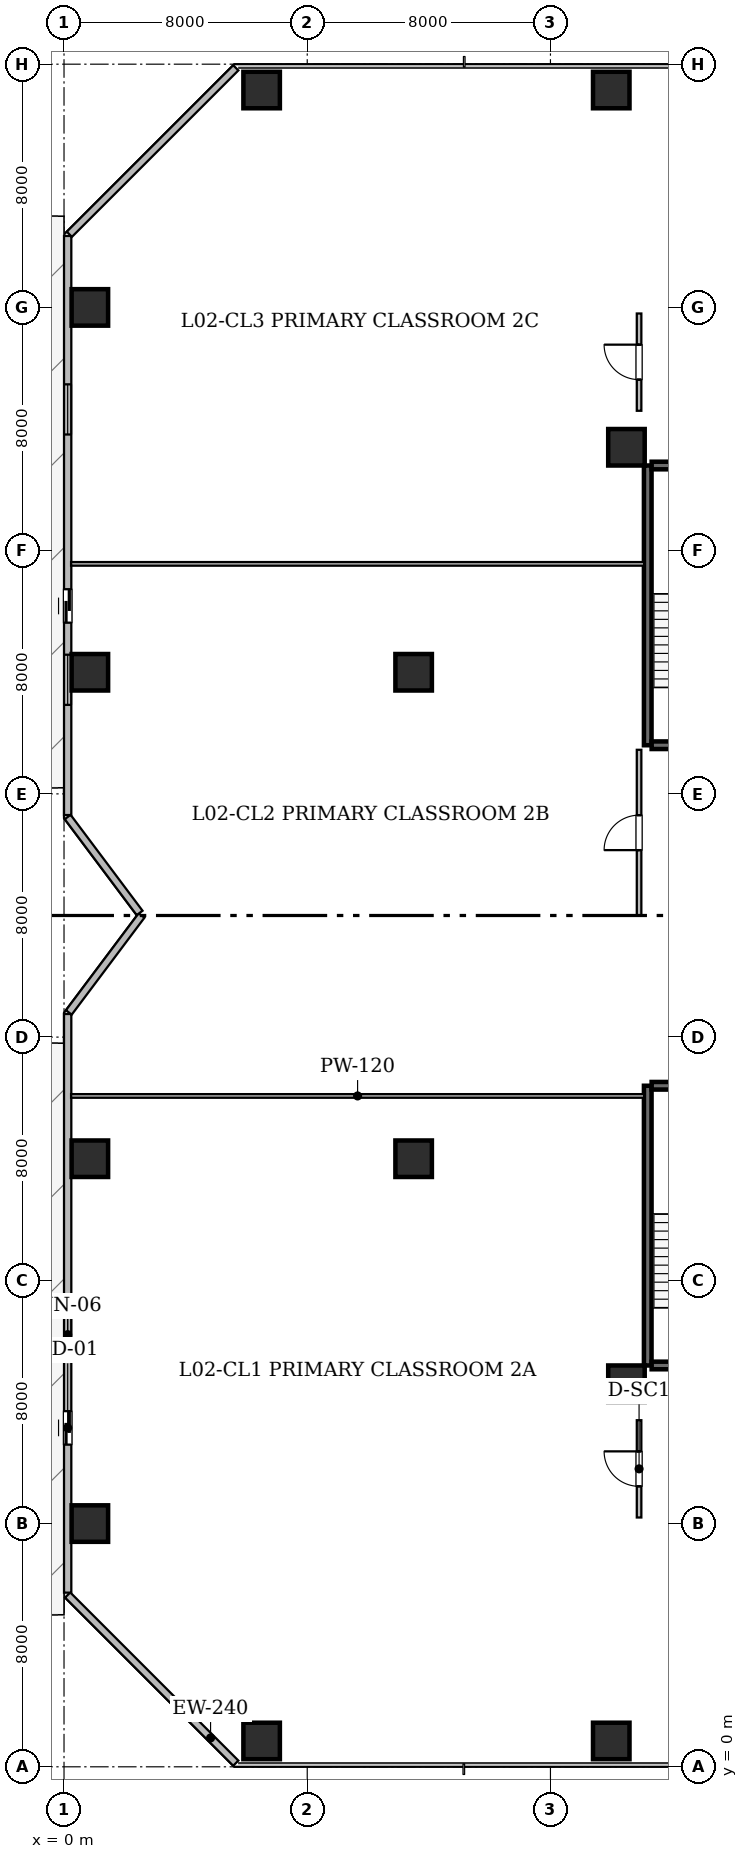
"""IFC4 building model, lengths in metres.
Left out: names, types, materials, properties, quantities, classifications, styles, units other than length and angle.
Written with IfcOpenShell. Run it as: python <this file> out.ifc"""

import sys

from ifc_helpers import new_model, si_unit, direction, frame, frame_2d, origin, origin_2d, place, context, subcontext, project, spatial, rectangle, hollow_rectangle, extrude, element, fill, save


model = new_model("IFC4")
c1 = context("Model", 3, precision=1e-05, world=origin(), true_north=direction((0.0, 1.0)))
c2 = subcontext(c1, "Body", "Model", "MODEL_VIEW")
j1 = project(units=[si_unit("LENGTHUNIT", "METRE"), si_unit("PLANEANGLEUNIT", "RADIAN")], contexts=[c1])
p1 = place(None, origin())
s1 = spatial("IfcSite", under=j1, at=p1, CompositionType="ELEMENT")
p2 = place(p1, origin())
s2 = spatial("IfcBuilding", under=s1, at=p2, CompositionType="ELEMENT")
p3 = place(p2, frame((0.0, 0.0, 12.0)))
s3 = spatial("IfcBuildingStorey", under=s2, at=p3, CompositionType="ELEMENT", Elevation=12.0)
for number, where, z_axis, x_axis in (
    (1, (6.5, 0.85, 0.0), (0.0, 0.0, 1.0), (1.0, 0.0, 0.0)),
    (2, (18.0, 0.85, 0.0), (0.0, 0.0, 1.0), (1.0, 0.0, 0.0)),
    (3, (6.5, 55.15, 0.0), (0.0, 0.0, 1.0), (1.0, 0.0, 0.0)),
    (4, (18.0, 55.15, 0.0), (0.0, 0.0, 1.0), (1.0, 0.0, 0.0)),
    (5, (0.85, 8.0, 0.0), (0.0, 0.0, 1.0), (1.0, 0.0, 0.0)),
    (6, (0.85, 20.0, 0.0), (0.0, 0.0, 1.0), (1.0, 0.0, 0.0)),
    (7, (0.85, 36.0, 0.0), (0.0, 0.0, 1.0), (1.0, 0.0, 0.0)),
    (8, (0.85, 48.0, 0.0), (0.0, 0.0, 1.0), (1.0, 0.0, 0.0)),
    (9, (18.5, 12.6, 0.0), (0.0, 0.0, 1.0), (1.0, 0.0, 0.0)),
    (10, (18.5, 43.4, 0.0), (0.0, 0.0, 1.0), (1.0, 0.0, 0.0)),
    (11, (11.5, 20.0, 0.0), (0.0, 0.0, 1.0), (1.0, 0.0, 0.0)),
    (12, (11.5, 36.0, 0.0), (0.0, 0.0, 1.0), (1.0, 0.0, 0.0)),
):
    element("IfcColumn", number, at=place(p3, frame(where, z_axis=z_axis, x_axis=x_axis)), inside=s3, PredefinedType="COLUMN", context=c2, shape_type="SweptSolid", body=[
        extrude(hollow_rectangle(XDim=1.2, YDim=1.2, WallThickness=0.06, at=origin_2d()), origin(), (0.0, 0.0, 1.0), 4.2),
    ])
p4 = place(p3, frame((5.65, 0.12, 0.0), z_axis=(0.0, 0.0, 1.0), x_axis=(-0.707106781187, 0.707106781187, 0.0)))
e13 = element("IfcWall", 13, at=p4, inside=s3, PredefinedType="STANDARD", context=c2, shape_type="SweptSolid", body=[
    extrude(rectangle(XDim=7.82, YDim=0.24, at=frame_2d((3.91, 0.0))), origin(), (0.0, 0.0, 1.0), 3.92),
])
p5 = place(p3, frame((0.12, 5.728, 0.0), z_axis=(0.0, 0.0, 1.0), x_axis=(0.0, 1.0, 0.0)))
e14 = element("IfcWall", 14, at=p5, inside=s3, PredefinedType="STANDARD", context=c2, shape_type="SweptSolid", body=[
    extrude(rectangle(XDim=19.032, YDim=0.24, at=frame_2d((9.516, 0.0))), origin(), (0.0, 0.0, 1.0), 3.92),
])
p6 = place(p5, frame((4.869, 0.0, 0.0)))
e15 = element("IfcOpeningElement", 15, at=p6, cuts=e14, PredefinedType="OPENING", context=c2, shape_type="SweptSolid", body=[
    extrude(rectangle(XDim=1.1, YDim=2.2, at=frame_2d((0.55, 1.1))), frame((0.0, 0.13, 0.0), z_axis=(0.0, -1.0, 0.0), x_axis=(1.0, 0.0, 0.0)), (0.0, 0.0, 1.0), 0.26),
])
p7 = place(p5, frame((7.661, 0.0, 0.85)))
e16 = element("IfcOpeningElement", 16, at=p7, cuts=e14, PredefinedType="OPENING", context=c2, shape_type="SweptSolid", body=[
    extrude(rectangle(XDim=1.65, YDim=1.55, at=frame_2d((0.825, 0.775))), frame((0.0, 0.13, 0.0), z_axis=(0.0, -1.0, 0.0), x_axis=(1.0, 0.0, 0.0)), (0.0, 0.0, 1.0), 0.26),
])
p8 = place(p3, frame((0.158, 24.811, 0.0), z_axis=(0.0, 0.0, 1.0), x_axis=(0.600058791648, 0.799955902889, 0.0)))
e17 = element("IfcWall", 17, at=p8, inside=s3, PredefinedType="STANDARD", context=c2, shape_type="SweptSolid", body=[
    extrude(rectangle(XDim=3.986, YDim=0.24, at=frame_2d((1.993, 0.0))), origin(), (0.0, 0.0, 1.0), 3.92),
])
p9 = place(p3, frame((2.487, 28.084, 0.0), z_axis=(0.0, 0.0, 1.0), x_axis=(-0.599990098106, 0.800007426325, 0.0)))
e18 = element("IfcWall", 18, at=p9, inside=s3, PredefinedType="STANDARD", context=c2, shape_type="SweptSolid", body=[
    extrude(rectangle(XDim=3.945, YDim=0.24, at=frame_2d((1.973, 0.0))), origin(), (0.0, 0.0, 1.0), 3.92),
])
p10 = place(p3, frame((0.12, 31.304, 0.0), z_axis=(0.0, 0.0, 1.0), x_axis=(0.0, 1.0, 0.0)))
e19 = element("IfcWall", 19, at=p10, inside=s3, PredefinedType="STANDARD", context=c2, shape_type="SweptSolid", body=[
    extrude(rectangle(XDim=19.046, YDim=0.24, at=frame_2d((9.523, 0.0))), origin(), (0.0, 0.0, 1.0), 3.92),
])
p11 = place(p10, frame((6.327, 0.0, 0.0)))
e20 = element("IfcOpeningElement", 20, at=p11, cuts=e19, PredefinedType="OPENING", context=c2, shape_type="SweptSolid", body=[
    extrude(rectangle(XDim=1.1, YDim=2.2, at=frame_2d((0.55, 1.1))), frame((0.0, 0.13, 0.0), z_axis=(0.0, -1.0, 0.0), x_axis=(1.0, 0.0, 0.0)), (0.0, 0.0, 1.0), 0.26),
])
p12 = place(p10, frame((3.623, 0.0, 0.85)))
e21 = element("IfcOpeningElement", 21, at=p12, cuts=e19, PredefinedType="OPENING", context=c2, shape_type="SweptSolid", body=[
    extrude(rectangle(XDim=1.65, YDim=1.55, at=frame_2d((0.825, 0.775))), frame((0.0, 0.13, 0.0), z_axis=(0.0, -1.0, 0.0), x_axis=(1.0, 0.0, 0.0)), (0.0, 0.0, 1.0), 0.26),
])
p13 = place(p10, frame((12.516, 0.0, 0.85)))
e22 = element("IfcOpeningElement", 22, at=p13, cuts=e19, PredefinedType="OPENING", context=c2, shape_type="SweptSolid", body=[
    extrude(rectangle(XDim=1.65, YDim=1.55, at=frame_2d((0.825, 0.775))), frame((0.0, 0.13, 0.0), z_axis=(0.0, -1.0, 0.0), x_axis=(1.0, 0.0, 0.0)), (0.0, 0.0, 1.0), 0.26),
])
p14 = place(p3, frame((0.175, 50.405, 0.0), z_axis=(0.0, 0.0, 1.0), x_axis=(0.707106781187, 0.707106781187, 0.0)))
e23 = element("IfcWall", 23, at=p14, inside=s3, PredefinedType="STANDARD", context=c2, shape_type="SweptSolid", body=[
    extrude(rectangle(XDim=7.743, YDim=0.24, at=frame_2d((3.871, 0.0))), origin(), (0.0, 0.0, 1.0), 3.92),
])
p15 = place(p3, frame((19.2, 13.2, 0.0), z_axis=(0.0, 0.0, 1.0), x_axis=(0.0, 1.0, 0.0)))
e24 = element("IfcWall", 24, at=p15, inside=s3, PredefinedType="SHEAR", context=c2, shape_type="SweptSolid", body=[
    extrude(rectangle(XDim=9.2, YDim=0.25, at=frame_2d((4.6, 0.0))), origin(), (0.0, 0.0, 1.0), 3.92),
])
for number, where, z_axis, x_axis in (
    (25, (19.329, 13.2, 0.0), (0.0, 0.0, 1.0), (1.0, 0.0, 0.0)),
    (26, (19.329, 22.4, 0.0), (0.0, 0.0, 1.0), (1.0, 0.0, 0.0)),
):
    element("IfcWall", number, at=place(p3, frame(where, z_axis=z_axis, x_axis=x_axis)), inside=s3, PredefinedType="SHEAR", context=c2, shape_type="SweptSolid", body=[
        extrude(rectangle(XDim=3.692, YDim=0.25, at=frame_2d((1.846, 0.0))), origin(), (0.0, 0.0, 1.0), 3.92),
    ])
p16 = place(p3, frame((19.2, 33.6, 0.0), z_axis=(0.0, 0.0, 1.0), x_axis=(0.0, 1.0, 0.0)))
e27 = element("IfcWall", 27, at=p16, inside=s3, PredefinedType="SHEAR", context=c2, shape_type="SweptSolid", body=[
    extrude(rectangle(XDim=9.2, YDim=0.25, at=frame_2d((4.6, 0.0))), origin(), (0.0, 0.0, 1.0), 3.92),
])
for number, where, z_axis, x_axis in (
    (28, (19.329, 33.6, 0.0), (0.0, 0.0, 1.0), (1.0, 0.0, 0.0)),
    (29, (19.329, 42.8, 0.0), (0.0, 0.0, 1.0), (1.0, 0.0, 0.0)),
):
    element("IfcWall", number, at=place(p3, frame(where, z_axis=z_axis, x_axis=x_axis)), inside=s3, PredefinedType="SHEAR", context=c2, shape_type="SweptSolid", body=[
        extrude(rectangle(XDim=3.692, YDim=0.25, at=frame_2d((1.846, 0.0))), origin(), (0.0, 0.0, 1.0), 3.92),
    ])
p17 = place(p3, frame((18.915, 8.2, 0.0), z_axis=(0.0, 0.0, 1.0), x_axis=(0.0, 1.0, 0.0)))
e30 = element("IfcWall", 30, at=p17, inside=s3, PredefinedType="STANDARD", context=c2, shape_type="SweptSolid", body=[
    extrude(rectangle(XDim=3.2, YDim=0.15, at=frame_2d((1.6, 0.0))), origin(), (0.0, 0.0, 1.0), 3.92),
])
p18 = place(p17, frame((1.025, 0.0, 0.0)))
e31 = element("IfcOpeningElement", 31, at=p18, cuts=e30, PredefinedType="OPENING", context=c2, shape_type="SweptSolid", body=[
    extrude(rectangle(XDim=1.15, YDim=2.2, at=frame_2d((0.575, 1.1))), frame((0.0, 0.085, 0.0), z_axis=(0.0, -1.0, 0.0), x_axis=(1.0, 0.0, 0.0)), (0.0, 0.0, 1.0), 0.17),
])
p19 = place(p3, frame((18.915, 28.0, 0.0), z_axis=(0.0, 0.0, 1.0), x_axis=(0.0, 1.0, 0.0)))
e32 = element("IfcWall", 32, at=p19, inside=s3, PredefinedType="STANDARD", context=c2, shape_type="SweptSolid", body=[
    extrude(rectangle(XDim=5.45, YDim=0.15, at=frame_2d((2.725, 0.0))), origin(), (0.0, 0.0, 1.0), 3.92),
])
p20 = place(p19, frame((2.15, 0.0, 0.0)))
e33 = element("IfcOpeningElement", 33, at=p20, cuts=e32, PredefinedType="OPENING", context=c2, shape_type="SweptSolid", body=[
    extrude(rectangle(XDim=1.15, YDim=2.2, at=frame_2d((0.575, 1.1))), frame((0.0, 0.085, 0.0), z_axis=(0.0, -1.0, 0.0), x_axis=(1.0, 0.0, 0.0)), (0.0, 0.0, 1.0), 0.17),
])
p21 = place(p3, frame((18.915, 44.6, 0.0), z_axis=(0.0, 0.0, 1.0), x_axis=(0.0, 1.0, 0.0)))
e34 = element("IfcWall", 34, at=p21, inside=s3, PredefinedType="STANDARD", context=c2, shape_type="SweptSolid", body=[
    extrude(rectangle(XDim=3.2, YDim=0.15, at=frame_2d((1.6, 0.0))), origin(), (0.0, 0.0, 1.0), 3.92),
])
p22 = place(p21, frame((1.025, 0.0, 0.0)))
e35 = element("IfcOpeningElement", 35, at=p22, cuts=e34, PredefinedType="OPENING", context=c2, shape_type="SweptSolid", body=[
    extrude(rectangle(XDim=1.15, YDim=2.2, at=frame_2d((0.575, 1.1))), frame((0.0, 0.085, 0.0), z_axis=(0.0, -1.0, 0.0), x_axis=(1.0, 0.0, 0.0)), (0.0, 0.0, 1.0), 0.17),
])
for number, where, z_axis, x_axis in (
    (36, (0.232, 22.065, 0.0), (0.0, 0.0, 1.0), (1.0, 0.0, 0.0)),
    (37, (0.232, 39.565, 0.0), (0.0, 0.0, 1.0), (1.0, 0.0, 0.0)),
):
    element("IfcWall", number, at=place(p3, frame(where, z_axis=z_axis, x_axis=x_axis)), inside=s3, PredefinedType="PARTITIONING", context=c2, shape_type="SweptSolid", body=[
        extrude(rectangle(XDim=18.849, YDim=0.12, at=frame_2d((9.425, 0.0))), origin(), (0.0, 0.0, 1.0), 3.055),
    ])
p23 = place(p6, origin())
e38 = element("IfcDoor", 38, at=p23, inside=s3, OperationType="SLIDING_TO_LEFT", PredefinedType="DOOR", context=c2, shape_type="SweptSolid", body=[
    extrude(rectangle(XDim=1.1, YDim=2.2, at=frame_2d((0.55, 1.1))), frame((0.0, 0.025, 0.0), z_axis=(0.0, -1.0, 0.0), x_axis=(1.0, 0.0, 0.0)), (0.0, 0.0, 1.0), 0.05),
])
fill(e15, e38)
p24 = place(p11, origin())
e39 = element("IfcDoor", 39, at=p24, inside=s3, OperationType="SLIDING_TO_LEFT", PredefinedType="DOOR", context=c2, shape_type="SweptSolid", body=[
    extrude(rectangle(XDim=1.1, YDim=2.2, at=frame_2d((0.55, 1.1))), frame((0.0, 0.025, 0.0), z_axis=(0.0, -1.0, 0.0), x_axis=(1.0, 0.0, 0.0)), (0.0, 0.0, 1.0), 0.05),
])
fill(e20, e39)
p25 = place(p7, origin())
e40 = element("IfcWindow", 40, at=p25, inside=s3, PartitioningType="SINGLE_PANEL", PredefinedType="WINDOW", context=c2, shape_type="SweptSolid", body=[
    extrude(rectangle(XDim=1.65, YDim=1.55, at=frame_2d((0.825, 0.775))), frame((0.0, 0.03, 0.0), z_axis=(0.0, -1.0, 0.0), x_axis=(1.0, 0.0, 0.0)), (0.0, 0.0, 1.0), 0.06),
])
fill(e16, e40)
p26 = place(p12, origin())
e41 = element("IfcWindow", 41, at=p26, inside=s3, PartitioningType="SINGLE_PANEL", PredefinedType="WINDOW", context=c2, shape_type="SweptSolid", body=[
    extrude(rectangle(XDim=1.65, YDim=1.55, at=frame_2d((0.825, 0.775))), frame((0.0, 0.03, 0.0), z_axis=(0.0, -1.0, 0.0), x_axis=(1.0, 0.0, 0.0)), (0.0, 0.0, 1.0), 0.06),
])
fill(e21, e41)
p27 = place(p13, origin())
e42 = element("IfcWindow", 42, at=p27, inside=s3, PartitioningType="SINGLE_PANEL", PredefinedType="WINDOW", context=c2, shape_type="SweptSolid", body=[
    extrude(rectangle(XDim=1.65, YDim=1.55, at=frame_2d((0.825, 0.775))), frame((0.0, 0.03, 0.0), z_axis=(0.0, -1.0, 0.0), x_axis=(1.0, 0.0, 0.0)), (0.0, 0.0, 1.0), 0.06),
])
fill(e22, e42)
p28 = place(p18, origin())
e43 = element("IfcDoor", 43, at=p28, inside=s3, OperationType="SINGLE_SWING_RIGHT", PredefinedType="DOOR", context=c2, shape_type="SweptSolid", body=[
    extrude(rectangle(XDim=1.15, YDim=2.2, at=frame_2d((0.575, 1.1))), frame((0.0, 0.025, 0.0), z_axis=(0.0, -1.0, 0.0), x_axis=(1.0, 0.0, 0.0)), (0.0, 0.0, 1.0), 0.05),
])
fill(e31, e43)
p29 = place(p20, origin())
e44 = element("IfcDoor", 44, at=p29, inside=s3, OperationType="SINGLE_SWING_LEFT", PredefinedType="DOOR", context=c2, shape_type="SweptSolid", body=[
    extrude(rectangle(XDim=1.15, YDim=2.2, at=frame_2d((0.575, 1.1))), frame((0.0, 0.025, 0.0), z_axis=(0.0, -1.0, 0.0), x_axis=(1.0, 0.0, 0.0)), (0.0, 0.0, 1.0), 0.05),
])
fill(e33, e44)
p30 = place(p22, origin())
e45 = element("IfcDoor", 45, at=p30, inside=s3, OperationType="SINGLE_SWING_RIGHT", PredefinedType="DOOR", context=c2, shape_type="SweptSolid", body=[
    extrude(rectangle(XDim=1.15, YDim=2.2, at=frame_2d((0.575, 1.1))), frame((0.0, 0.025, 0.0), z_axis=(0.0, -1.0, 0.0), x_axis=(1.0, 0.0, 0.0)), (0.0, 0.0, 1.0), 0.05),
])
fill(e35, e45)
save(model, sys.argv[1])
